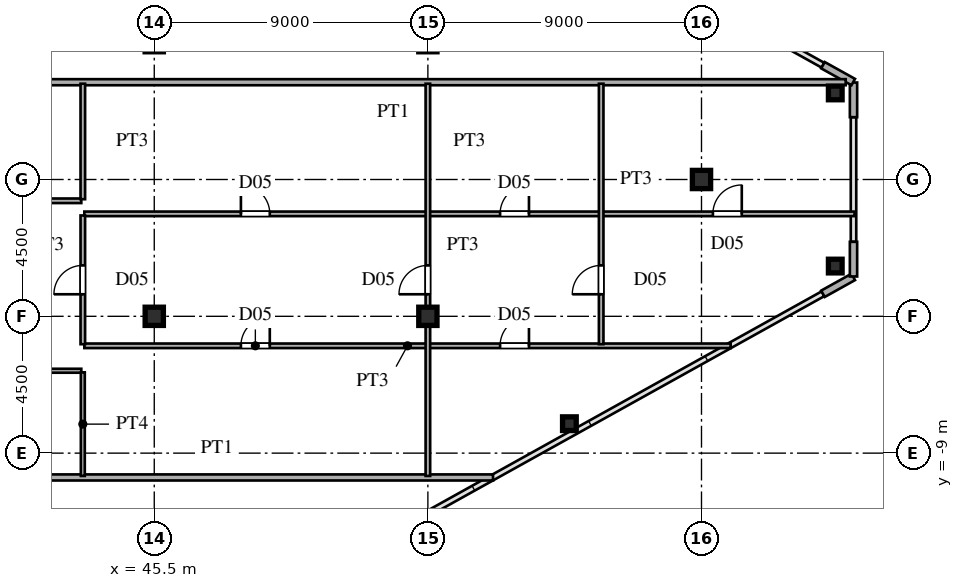
"""IFC4 building model, lengths in metres.
Left out: names, types, materials, properties, quantities, classifications, styles, units other than length and angle.
Written with IfcOpenShell. Run it as: python <this file> out.ifc"""

import sys

from ifc_helpers import new_model, si_unit, direction, frame, frame_2d, origin, origin_2d, place, context, subcontext, project, spatial, rectangle, hollow_rectangle, i_section, extrude, source, transform, mapped, element, fill, save


model = new_model("IFC4")
c1 = context("Model", 3, precision=1e-05, world=origin(), true_north=direction((0.0, 1.0)))
c2 = subcontext(c1, "Body", "Model", "MODEL_VIEW")
j1 = project(units=[si_unit("LENGTHUNIT", "METRE"), si_unit("PLANEANGLEUNIT", "RADIAN")], contexts=[c1])
p1 = place(None, origin())
s1 = spatial("IfcSite", under=j1, at=p1, CompositionType="ELEMENT")
p2 = place(p1, origin())
s2 = spatial("IfcBuilding", under=s1, at=p2, CompositionType="ELEMENT")
p3 = place(p2, frame((0.0, 0.0, 185.1)))
s3 = spatial("IfcBuildingStorey", under=s2, at=p3, CompositionType="ELEMENT", Elevation=185.1)
m1 = source(origin(), c2, "Body", "SweptSolid", [
    extrude(i_section(OverallWidth=0.6, OverallDepth=0.6, WebThickness=0.025, FlangeThickness=0.04, at=origin_2d()), origin(), (0.0, 0.0, 1.0), 3.6),
])
for number, where, z_axis, x_axis in (
    (1, (45.5, -4.5, 0.0), (0.0, 0.0, 1.0), (1.0, 0.0, 0.0)),
    (2, (54.5, -4.5, 0.0), (0.0, 0.0, 1.0), (1.0, 0.0, 0.0)),
    (3, (63.5, 0.0, 0.0), (0.0, 0.0, 1.0), (1.0, 0.0, 0.0)),
):
    element("IfcColumn", number, at=place(p3, frame(where, z_axis=z_axis, x_axis=x_axis)), inside=s3, PredefinedType="COLUMN", context=c2, shape_type="MappedRepresentation", body=[
        mapped(m1, transform((0.0, 0.0, 0.0), scale=1.0)),
    ])
m2 = source(origin(), c2, "Body", "SweptSolid", [
    extrude(hollow_rectangle(XDim=0.45, YDim=0.45, WallThickness=0.018, at=origin_2d()), origin(), (0.0, 0.0, 1.0), 3.6),
])
for number, where, z_axis, x_axis in (
    (4, (67.9, -2.847, 0.0), (0.0, 0.0, 1.0), (1.0, 0.0, 0.0)),
    (5, (67.9, 2.847, 0.0), (0.0, 0.0, 1.0), (1.0, 0.0, 0.0)),
    (6, (59.155, -8.031, 0.0), (0.0, 0.0, 1.0), (1.0, 0.0, 0.0)),
):
    element("IfcColumn", number, at=place(p3, frame(where, z_axis=z_axis, x_axis=x_axis)), inside=s3, PredefinedType="COLUMN", context=c2, shape_type="MappedRepresentation", body=[
        mapped(m2, transform((0.0, 0.0, 0.0), scale=1.0)),
    ])
for number, where, z_axis, x_axis in (
    (7, (67.495, -3.759, 0.0), (0.0, 0.0, 1.0), (0.874, 0.486, 0.0)),
    (8, (68.5, -3.19, 0.0), (0.0, 0.0, 1.0), (0.0, 1.0, 0.0)),
    (9, (68.5, 2.05, 0.0), (0.0, 0.0, 1.0), (0.0, 1.0, 0.0)),
    (10, (68.491, 3.205, 0.0), (0.0, 0.0, 1.0), (-0.874, 0.486, 0.0)),
):
    element("IfcWall", number, at=place(p3, frame(where, z_axis=z_axis, x_axis=x_axis)), inside=s3, PredefinedType="SOLIDWALL", context=c2, shape_type="SweptSolid", body=[
        extrude(rectangle(XDim=1.14, YDim=0.24, at=frame_2d((0.57, 0.0))), origin(), (0.0, 0.0, 1.0), 3.38),
    ])
p4 = place(p3, frame((38.48, -9.8, 0.0), z_axis=(0.0, 0.0, 1.0), x_axis=(1.0, 0.0, 0.0)))
e11 = element("IfcWall", 11, at=p4, inside=s3, PredefinedType="PARTITIONING", context=c2, shape_type="SweptSolid", body=[
    extrude(rectangle(XDim=18.163, YDim=0.2, at=frame_2d((9.082, 0.0))), origin(), (0.0, 0.0, 1.0), 3.38),
])
p5 = place(p3, frame((38.45, -6.29, 0.0), z_axis=(0.0, 0.0, 1.0), x_axis=(1.0, 0.0, 0.0)))
e12 = element("IfcWall", 12, at=p5, inside=s3, PredefinedType="PARTITIONING", context=c2, shape_type="SweptSolid", body=[
    extrude(rectangle(XDim=4.65, YDim=0.13, at=frame_2d((2.325, 0.0))), origin(), (0.0, 0.0, 1.0), 3.38),
])
p6 = place(p5, frame((1.885, 0.0, 0.0)))
e13 = element("IfcOpeningElement", 13, at=p6, cuts=e12, PredefinedType="OPENING", context=c2, shape_type="SweptSolid", body=[
    extrude(rectangle(XDim=0.88, YDim=2.1, at=frame_2d((0.44, 1.05))), frame((0.0, 0.075, 0.0), z_axis=(0.0, -1.0, 0.0), x_axis=(1.0, 0.0, 0.0)), (0.0, 0.0, 1.0), 0.15),
])
p7 = place(p3, frame((43.2, -5.47, 0.0), z_axis=(0.0, 0.0, 1.0), x_axis=(1.0, 0.0, 0.0)))
e14 = element("IfcWall", 14, at=p7, inside=s3, PredefinedType="PARTITIONING", context=c2, shape_type="SweptSolid", body=[
    extrude(rectangle(XDim=21.259, YDim=0.15, at=frame_2d((10.629, 0.0))), origin(), (0.0, 0.0, 1.0), 3.38),
])
p8 = place(p7, frame((5.15, 0.0, 0.0)))
e15 = element("IfcOpeningElement", 15, at=p8, cuts=e14, PredefinedType="OPENING", context=c2, shape_type="SweptSolid", body=[
    extrude(rectangle(XDim=0.95, YDim=2.15, at=frame_2d((0.475, 1.075))), frame((0.0, 0.085, 0.0), z_axis=(0.0, -1.0, 0.0), x_axis=(1.0, 0.0, 0.0)), (0.0, 0.0, 1.0), 0.17),
])
p9 = place(p7, frame((13.675, 0.0, 0.0)))
e16 = element("IfcOpeningElement", 16, at=p9, cuts=e14, PredefinedType="OPENING", context=c2, shape_type="SweptSolid", body=[
    extrude(rectangle(XDim=0.95, YDim=2.15, at=frame_2d((0.475, 1.075))), frame((0.0, 0.085, 0.0), z_axis=(0.0, -1.0, 0.0), x_axis=(1.0, 0.0, 0.0)), (0.0, 0.0, 1.0), 0.17),
])
p10 = place(p3, frame((43.2, -1.13, 0.0), z_axis=(0.0, 0.0, 1.0), x_axis=(1.0, 0.0, 0.0)))
e17 = element("IfcWall", 17, at=p10, inside=s3, PredefinedType="PARTITIONING", context=c2, shape_type="SweptSolid", body=[
    extrude(rectangle(XDim=25.335, YDim=0.15, at=frame_2d((12.667, 0.0))), origin(), (0.0, 0.0, 1.0), 3.38),
])
p11 = place(p10, frame((5.15, 0.0, 0.0)))
e18 = element("IfcOpeningElement", 18, at=p11, cuts=e17, PredefinedType="OPENING", context=c2, shape_type="SweptSolid", body=[
    extrude(rectangle(XDim=0.95, YDim=2.15, at=frame_2d((0.475, 1.075))), frame((0.0, 0.085, 0.0), z_axis=(0.0, -1.0, 0.0), x_axis=(1.0, 0.0, 0.0)), (0.0, 0.0, 1.0), 0.17),
])
p12 = place(p10, frame((20.675, 0.0, 0.0)))
e19 = element("IfcOpeningElement", 19, at=p12, cuts=e17, PredefinedType="OPENING", context=c2, shape_type="SweptSolid", body=[
    extrude(rectangle(XDim=0.95, YDim=2.15, at=frame_2d((0.475, 1.075))), frame((0.0, 0.085, 0.0), z_axis=(0.0, -1.0, 0.0), x_axis=(1.0, 0.0, 0.0)), (0.0, 0.0, 1.0), 0.17),
])
p13 = place(p10, frame((13.675, 0.0, 0.0)))
e20 = element("IfcOpeningElement", 20, at=p13, cuts=e17, PredefinedType="OPENING", context=c2, shape_type="SweptSolid", body=[
    extrude(rectangle(XDim=0.95, YDim=2.15, at=frame_2d((0.475, 1.075))), frame((0.0, 0.085, 0.0), z_axis=(0.0, -1.0, 0.0), x_axis=(1.0, 0.0, 0.0)), (0.0, 0.0, 1.0), 0.17),
])
p14 = place(p3, frame((38.45, -0.7, 0.0), z_axis=(0.0, 0.0, 1.0), x_axis=(1.0, 0.0, 0.0)))
e21 = element("IfcWall", 21, at=p14, inside=s3, PredefinedType="PARTITIONING", context=c2, shape_type="SweptSolid", body=[
    extrude(rectangle(XDim=4.65, YDim=0.15, at=frame_2d((2.325, 0.0))), origin(), (0.0, 0.0, 1.0), 3.38),
])
p15 = place(p14, frame((1.85, 0.0, 0.0)))
e22 = element("IfcOpeningElement", 22, at=p15, cuts=e21, PredefinedType="OPENING", context=c2, shape_type="SweptSolid", body=[
    extrude(rectangle(XDim=0.95, YDim=2.15, at=frame_2d((0.475, 1.075))), frame((0.0, 0.085, 0.0), z_axis=(0.0, -1.0, 0.0), x_axis=(1.0, 0.0, 0.0)), (0.0, 0.0, 1.0), 0.17),
])
p16 = place(p3, frame((38.48, 3.2, 0.0), z_axis=(0.0, 0.0, 1.0), x_axis=(1.0, 0.0, 0.0)))
e23 = element("IfcWall", 23, at=p16, inside=s3, PredefinedType="PARTITIONING", context=c2, shape_type="SweptSolid", body=[
    extrude(rectangle(XDim=29.763, YDim=0.2, at=frame_2d((14.881, 0.0))), origin(), (0.0, 0.0, 1.0), 3.38),
])
p17 = place(p3, frame((43.15, -9.75, 0.0), z_axis=(0.0, 0.0, 1.0), x_axis=(0.0, 1.0, 0.0)))
e24 = element("IfcWall", 24, at=p17, inside=s3, PredefinedType="PARTITIONING", context=c2, shape_type="SweptSolid", body=[
    extrude(rectangle(XDim=3.408, YDim=0.13, at=frame_2d((1.704, 0.0))), origin(), (0.0, 0.0, 1.0), 3.38),
])
p18 = place(p3, frame((43.15, -5.417, 0.0), z_axis=(0.0, 0.0, 1.0), x_axis=(0.0, 1.0, 0.0)))
e25 = element("IfcWall", 25, at=p18, inside=s3, PredefinedType="PARTITIONING", context=c2, shape_type="SweptSolid", body=[
    extrude(rectangle(XDim=4.234, YDim=0.15, at=frame_2d((2.117, 0.0))), origin(), (0.0, 0.0, 1.0), 2.99),
])
p19 = place(p18, frame((1.642, 0.0, 0.0)))
e26 = element("IfcOpeningElement", 26, at=p19, cuts=e25, PredefinedType="OPENING", context=c2, shape_type="SweptSolid", body=[
    extrude(rectangle(XDim=0.95, YDim=2.15, at=frame_2d((0.475, 1.075))), frame((0.0, 0.085, 0.0), z_axis=(0.0, -1.0, 0.0), x_axis=(1.0, 0.0, 0.0)), (0.0, 0.0, 1.0), 0.17),
])
p20 = place(p3, frame((43.15, -0.648, 0.0), z_axis=(0.0, 0.0, 1.0), x_axis=(0.0, 1.0, 0.0)))
e27 = element("IfcWall", 27, at=p20, inside=s3, PredefinedType="PARTITIONING", context=c2, shape_type="SweptSolid", body=[
    extrude(rectangle(XDim=3.798, YDim=0.15, at=frame_2d((1.899, 0.0))), origin(), (0.0, 0.0, 1.0), 3.38),
])
p21 = place(p3, frame((54.5, -9.75, 0.0), z_axis=(0.0, 0.0, 1.0), x_axis=(0.0, 1.0, 0.0)))
e28 = element("IfcWall", 28, at=p21, inside=s3, PredefinedType="PARTITIONING", context=c2, shape_type="SweptSolid", body=[
    extrude(rectangle(XDim=12.9, YDim=0.15, at=frame_2d((6.45, 0.0))), origin(), (0.0, 0.0, 1.0), 2.78),
])
p22 = place(p21, frame((5.975, 0.0, 0.0)))
e29 = element("IfcOpeningElement", 29, at=p22, cuts=e28, PredefinedType="OPENING", context=c2, shape_type="SweptSolid", body=[
    extrude(rectangle(XDim=0.95, YDim=2.15, at=frame_2d((0.475, 1.075))), frame((0.0, 0.085, 0.0), z_axis=(0.0, -1.0, 0.0), x_axis=(1.0, 0.0, 0.0)), (0.0, 0.0, 1.0), 0.17),
])
p23 = place(p3, frame((60.2, -5.417, 0.0), z_axis=(0.0, 0.0, 1.0), x_axis=(0.0, 1.0, 0.0)))
e30 = element("IfcWall", 30, at=p23, inside=s3, PredefinedType="PARTITIONING", context=c2, shape_type="SweptSolid", body=[
    extrude(rectangle(XDim=8.567, YDim=0.15, at=frame_2d((4.283, 0.0))), origin(), (0.0, 0.0, 1.0), 3.38),
])
p24 = place(p23, frame((1.642, 0.0, 0.0)))
e31 = element("IfcOpeningElement", 31, at=p24, cuts=e30, PredefinedType="OPENING", context=c2, shape_type="SweptSolid", body=[
    extrude(rectangle(XDim=0.95, YDim=2.15, at=frame_2d((0.475, 1.075))), frame((0.0, 0.085, 0.0), z_axis=(0.0, -1.0, 0.0), x_axis=(1.0, 0.0, 0.0)), (0.0, 0.0, 1.0), 0.17),
])
m3 = source(origin(), c2, "Body", "SweptSolid", [
    extrude(rectangle(XDim=0.95, YDim=2.15, at=frame_2d((0.475, 1.075))), frame((0.0, 0.025, 0.0), z_axis=(0.0, -1.0, 0.0), x_axis=(1.0, 0.0, 0.0)), (0.0, 0.0, 1.0), 0.05),
])
p25 = place(p8, origin())
e32 = element("IfcDoor", 32, at=p25, inside=s3, OperationType="SINGLE_SWING_RIGHT", PredefinedType="DOOR", context=c2, shape_type="MappedRepresentation", body=[
    mapped(m3, transform((0.0, 0.0, 0.0), scale=1.0)),
])
fill(e15, e32)
p26 = place(p9, origin())
e33 = element("IfcDoor", 33, at=p26, inside=s3, OperationType="SINGLE_SWING_RIGHT", PredefinedType="DOOR", context=c2, shape_type="MappedRepresentation", body=[
    mapped(m3, transform((0.0, 0.0, 0.0), scale=1.0)),
])
fill(e16, e33)
p27 = place(p11, origin())
e34 = element("IfcDoor", 34, at=p27, inside=s3, OperationType="SINGLE_SWING_LEFT", PredefinedType="DOOR", context=c2, shape_type="MappedRepresentation", body=[
    mapped(m3, transform((0.0, 0.0, 0.0), scale=1.0)),
])
fill(e18, e34)
p28 = place(p12, origin())
e35 = element("IfcDoor", 35, at=p28, inside=s3, OperationType="SINGLE_SWING_RIGHT", PredefinedType="DOOR", context=c2, shape_type="MappedRepresentation", body=[
    mapped(m3, transform((0.0, 0.0, 0.0), scale=1.0)),
])
fill(e19, e35)
p29 = place(p13, origin())
e36 = element("IfcDoor", 36, at=p29, inside=s3, OperationType="SINGLE_SWING_RIGHT", PredefinedType="DOOR", context=c2, shape_type="MappedRepresentation", body=[
    mapped(m3, transform((0.0, 0.0, 0.0), scale=1.0)),
])
fill(e20, e36)
p30 = place(p19, origin())
e37 = element("IfcDoor", 37, at=p30, inside=s3, OperationType="SINGLE_SWING_LEFT", PredefinedType="DOOR", context=c2, shape_type="MappedRepresentation", body=[
    mapped(m3, transform((0.0, 0.0, 0.0), scale=1.0)),
])
fill(e26, e37)
p31 = place(p22, origin())
e38 = element("IfcDoor", 38, at=p31, inside=s3, OperationType="SINGLE_SWING_LEFT", PredefinedType="DOOR", context=c2, shape_type="MappedRepresentation", body=[
    mapped(m3, transform((0.0, 0.0, 0.0), scale=1.0)),
])
fill(e29, e38)
p32 = place(p24, origin())
e39 = element("IfcDoor", 39, at=p32, inside=s3, OperationType="SINGLE_SWING_LEFT", PredefinedType="DOOR", context=c2, shape_type="MappedRepresentation", body=[
    mapped(m3, transform((0.0, 0.0, 0.0), scale=1.0)),
])
fill(e31, e39)
save(model, sys.argv[1])
